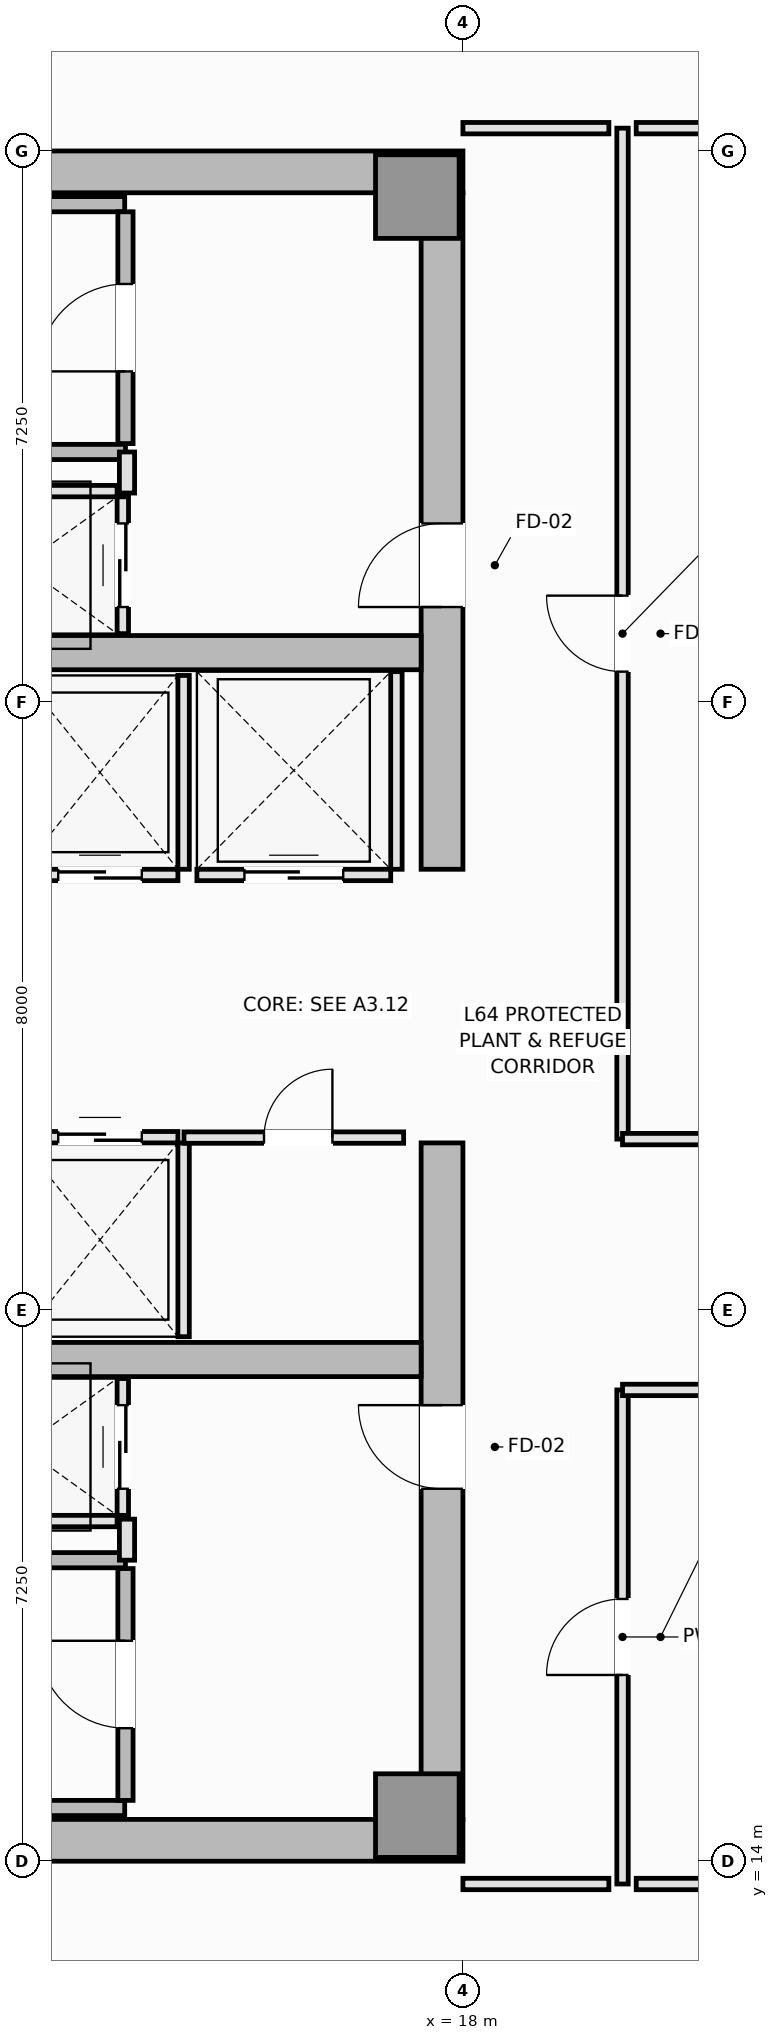
"""IFC4 building model, lengths in metres.
Left out: names, types, materials, properties, quantities, classifications, styles, units other than length and angle.
Written with IfcOpenShell. Run it as: python <this file> out.ifc"""

import sys

from ifc_helpers import new_model, si_unit, direction, frame, frame_2d, origin, origin_2d, place, context, subcontext, project, spatial, rectangle, extrude, element, fill, save


model = new_model("IFC4")
c1 = context("Model", 3, precision=1e-05, world=origin(), true_north=direction((0.0, 1.0)))
c2 = subcontext(c1, "Body", "Model", "MODEL_VIEW")
j1 = project(units=[si_unit("LENGTHUNIT", "METRE"), si_unit("PLANEANGLEUNIT", "RADIAN")], contexts=[c1])
p1 = place(None, origin())
s1 = spatial("IfcSite", under=j1, at=p1, CompositionType="ELEMENT")
p2 = place(p1, origin())
s2 = spatial("IfcBuilding", under=s1, at=p2, CompositionType="ELEMENT")
p3 = place(p2, frame((0.0, 0.0, 241.3)))
s3 = spatial("IfcBuildingStorey", under=s2, at=p3, CompositionType="ELEMENT", Elevation=241.3)
for number, where, z_axis, x_axis in (
    (1, (4.5, 14.275, 0.0), (0.0, 0.0, 1.0), (1.0, 0.0, 0.0)),
    (2, (4.5, 36.225, 0.0), (0.0, 0.0, 1.0), (1.0, 0.0, 0.0)),
):
    element("IfcWall", number, at=place(p3, frame(where, z_axis=z_axis, x_axis=x_axis)), inside=s3, PredefinedType="SHEAR", context=c2, shape_type="SweptSolid", body=[
        extrude(rectangle(XDim=13.5, YDim=0.55, at=frame_2d((6.75, 0.0))), origin(), (0.0, 0.0, 1.0), 3.55),
    ])
p4 = place(p3, frame((17.725, 14.55, 0.0), z_axis=(0.0, 0.0, 1.0), x_axis=(0.0, 1.0, 0.0)))
e3 = element("IfcWall", 3, at=p4, inside=s3, PredefinedType="SHEAR", context=c2, shape_type="SweptSolid", body=[
    extrude(rectangle(XDim=8.9, YDim=0.55, at=frame_2d((4.45, 0.0))), origin(), (0.0, 0.0, 1.0), 3.55),
])
p5 = place(p4, frame((4.35, 0.0, 0.0)))
e4 = element("IfcOpeningElement", 4, at=p5, cuts=e3, PredefinedType="OPENING", context=c2, shape_type="SweptSolid", body=[
    extrude(rectangle(XDim=1.1, YDim=2.15, at=frame_2d((0.55, 1.075))), frame((0.0, 0.285, 0.0), z_axis=(0.0, -1.0, 0.0), x_axis=(1.0, 0.0, 0.0)), (0.0, 0.0, 1.0), 0.57),
])
p6 = place(p3, frame((17.725, 27.05, 0.0), z_axis=(0.0, 0.0, 1.0), x_axis=(0.0, 1.0, 0.0)))
e5 = element("IfcWall", 5, at=p6, inside=s3, PredefinedType="SHEAR", context=c2, shape_type="SweptSolid", body=[
    extrude(rectangle(XDim=8.9, YDim=0.55, at=frame_2d((4.45, 0.0))), origin(), (0.0, 0.0, 1.0), 3.55),
])
p7 = place(p6, frame((3.45, 0.0, 0.0)))
e6 = element("IfcOpeningElement", 6, at=p7, cuts=e5, PredefinedType="OPENING", context=c2, shape_type="SweptSolid", body=[
    extrude(rectangle(XDim=1.1, YDim=2.15, at=frame_2d((0.55, 1.075))), frame((0.0, 0.285, 0.0), z_axis=(0.0, -1.0, 0.0), x_axis=(1.0, 0.0, 0.0)), (0.0, 0.0, 1.0), 0.57),
])
for number, where, z_axis, x_axis in (
    (7, (5.05, 20.6, 0.0), (0.0, 0.0, 1.0), (1.0, 0.0, 0.0)),
    (8, (5.05, 29.9, 0.0), (0.0, 0.0, 1.0), (1.0, 0.0, 0.0)),
):
    element("IfcWall", number, at=place(p3, frame(where, z_axis=z_axis, x_axis=x_axis)), inside=s3, PredefinedType="SHEAR", context=c2, shape_type="SweptSolid", body=[
        extrude(rectangle(XDim=12.4, YDim=0.45, at=frame_2d((6.2, 0.0))), origin(), (0.0, 0.0, 1.0), 3.55),
    ])
for number, where, z_axis, x_axis in (
    (9, (17.4, 14.6, 0.0), (0.0, 0.0, 1.0), (1.0, 0.0, 0.0)),
    (10, (17.4, 35.9, 0.0), (0.0, 0.0, 1.0), (1.0, 0.0, 0.0)),
):
    element("IfcColumn", number, at=place(p3, frame(where, z_axis=z_axis, x_axis=x_axis)), inside=s3, PredefinedType="PILASTER", context=c2, shape_type="SweptSolid", body=[
        extrude(rectangle(XDim=1.1, YDim=1.1, at=origin_2d()), origin(), (0.0, 0.0, 1.0), 3.55),
    ])
p8 = place(p3, frame((5.8, 14.7, 0.0), z_axis=(0.0, 0.0, 1.0), x_axis=(1.0, 0.0, 0.0)))
e11 = element("IfcWall", 11, at=p8, inside=s3, PredefinedType="SOLIDWALL", context=c2, shape_type="SweptSolid", body=[
    extrude(rectangle(XDim=7.75, YDim=0.2, at=frame_2d((3.875, 0.0))), origin(), (0.0, 0.0, 1.0), 3.55),
])
p9 = place(p3, frame((5.9, 17.96, 0.0), z_axis=(0.0, 0.0, 1.0), x_axis=(1.0, 0.0, 0.0)))
e12 = element("IfcWall", 12, at=p9, inside=s3, PredefinedType="SOLIDWALL", context=c2, shape_type="SweptSolid", body=[
    extrude(rectangle(XDim=7.66, YDim=0.2, at=frame_2d((3.83, 0.0))), origin(), (0.0, 0.0, 1.0), 3.55),
])
p10 = place(p3, frame((13.56, 14.8, 0.0), z_axis=(0.0, 0.0, 1.0), x_axis=(0.0, 1.0, 0.0)))
e13 = element("IfcWall", 13, at=p10, inside=s3, PredefinedType="SOLIDWALL", context=c2, shape_type="SweptSolid", body=[
    extrude(rectangle(XDim=3.05, YDim=0.2, at=frame_2d((1.525, 0.0))), origin(), (0.0, 0.0, 1.0), 3.55),
])
p11 = place(p10, frame((0.95, 0.0, 0.0)))
e14 = element("IfcOpeningElement", 14, at=p11, cuts=e13, PredefinedType="OPENING", context=c2, shape_type="SweptSolid", body=[
    extrude(rectangle(XDim=1.15, YDim=2.15, at=frame_2d((0.575, 1.075))), frame((0.0, 0.11, 0.0), z_axis=(0.0, -1.0, 0.0), x_axis=(1.0, 0.0, 0.0)), (0.0, 0.0, 1.0), 0.22),
])
p12 = place(p3, frame((5.8, 35.8, 0.0), z_axis=(0.0, 0.0, 1.0), x_axis=(1.0, 0.0, 0.0)))
e15 = element("IfcWall", 15, at=p12, inside=s3, PredefinedType="SOLIDWALL", context=c2, shape_type="SweptSolid", body=[
    extrude(rectangle(XDim=7.75, YDim=0.2, at=frame_2d((3.875, 0.0))), origin(), (0.0, 0.0, 1.0), 3.55),
])
p13 = place(p3, frame((5.9, 32.54, 0.0), z_axis=(0.0, 0.0, 1.0), x_axis=(1.0, 0.0, 0.0)))
e16 = element("IfcWall", 16, at=p13, inside=s3, PredefinedType="SOLIDWALL", context=c2, shape_type="SweptSolid", body=[
    extrude(rectangle(XDim=7.66, YDim=0.2, at=frame_2d((3.83, 0.0))), origin(), (0.0, 0.0, 1.0), 3.55),
])
p14 = place(p3, frame((13.56, 32.65, 0.0), z_axis=(0.0, 0.0, 1.0), x_axis=(0.0, 1.0, 0.0)))
e17 = element("IfcWall", 17, at=p14, inside=s3, PredefinedType="SOLIDWALL", context=c2, shape_type="SweptSolid", body=[
    extrude(rectangle(XDim=3.05, YDim=0.2, at=frame_2d((1.525, 0.0))), origin(), (0.0, 0.0, 1.0), 3.55),
])
p15 = place(p14, frame((0.95, 0.0, 0.0)))
e18 = element("IfcOpeningElement", 18, at=p15, cuts=e17, PredefinedType="OPENING", context=c2, shape_type="SweptSolid", body=[
    extrude(rectangle(XDim=1.15, YDim=2.15, at=frame_2d((0.575, 1.075))), frame((0.0, 0.11, 0.0), z_axis=(0.0, -1.0, 0.0), x_axis=(1.0, 0.0, 0.0)), (0.0, 0.0, 1.0), 0.22),
])
p16 = place(p3, frame((12.2, 23.525, 0.0), z_axis=(0.0, 0.0, 1.0), x_axis=(1.0, 0.0, 0.0)))
e19 = element("IfcWall", 19, at=p16, inside=s3, PredefinedType="PARTITIONING", context=c2, shape_type="SweptSolid", body=[
    extrude(rectangle(XDim=2.05, YDim=0.15, at=frame_2d((1.025, 0.0))), origin(), (0.0, 0.0, 1.0), 3.39),
])
p17 = place(p16, frame((0.475, 0.0, 0.0)))
e20 = element("IfcOpeningElement", 20, at=p17, cuts=e19, PredefinedType="OPENING", context=c2, shape_type="SweptSolid", body=[
    extrude(rectangle(XDim=1.1, YDim=2.2, at=frame_2d((0.55, 1.1))), frame((0.0, 0.085, 0.0), z_axis=(0.0, -1.0, 0.0), x_axis=(1.0, 0.0, 0.0)), (0.0, 0.0, 1.0), 0.17),
])
p18 = place(p3, frame((14.325, 20.9, 0.0), z_axis=(0.0, 0.0, 1.0), x_axis=(0.0, 1.0, 0.0)))
e21 = element("IfcWall", 21, at=p18, inside=s3, PredefinedType="PARTITIONING", context=c2, shape_type="SweptSolid", body=[
    extrude(rectangle(XDim=2.55, YDim=0.15, at=frame_2d((1.275, 0.0))), origin(), (0.0, 0.0, 1.0), 3.39),
])
p19 = place(p3, frame((12.2, 26.975, 0.0), z_axis=(0.0, 0.0, 1.0), x_axis=(1.0, 0.0, 0.0)))
e22 = element("IfcWall", 22, at=p19, inside=s3, PredefinedType="PARTITIONING", context=c2, shape_type="SweptSolid", body=[
    extrude(rectangle(XDim=2.05, YDim=0.15, at=frame_2d((1.025, 0.0))), origin(), (0.0, 0.0, 1.0), 3.39),
])
p20 = place(p19, frame((0.475, 0.0, 0.0)))
e23 = element("IfcOpeningElement", 23, at=p20, cuts=e22, PredefinedType="OPENING", context=c2, shape_type="SweptSolid", body=[
    extrude(rectangle(XDim=1.1, YDim=2.2, at=frame_2d((0.55, 1.1))), frame((0.0, 0.085, 0.0), z_axis=(0.0, -1.0, 0.0), x_axis=(1.0, 0.0, 0.0)), (0.0, 0.0, 1.0), 0.17),
])
p21 = place(p3, frame((14.325, 27.05, 0.0), z_axis=(0.0, 0.0, 1.0), x_axis=(0.0, 1.0, 0.0)))
e24 = element("IfcWall", 24, at=p21, inside=s3, PredefinedType="PARTITIONING", context=c2, shape_type="SweptSolid", body=[
    extrude(rectangle(XDim=2.55, YDim=0.15, at=frame_2d((1.275, 0.0))), origin(), (0.0, 0.0, 1.0), 3.39),
])
p22 = place(p3, frame((14.5, 26.975, 0.0), z_axis=(0.0, 0.0, 1.0), x_axis=(1.0, 0.0, 0.0)))
e25 = element("IfcWall", 25, at=p22, inside=s3, PredefinedType="PARTITIONING", context=c2, shape_type="SweptSolid", body=[
    extrude(rectangle(XDim=2.55, YDim=0.15, at=frame_2d((1.275, 0.0))), origin(), (0.0, 0.0, 1.0), 3.39),
])
p23 = place(p22, frame((0.625, 0.0, 0.0)))
e26 = element("IfcOpeningElement", 26, at=p23, cuts=e25, PredefinedType="OPENING", context=c2, shape_type="SweptSolid", body=[
    extrude(rectangle(XDim=1.3, YDim=2.2, at=frame_2d((0.65, 1.1))), frame((0.0, 0.085, 0.0), z_axis=(0.0, -1.0, 0.0), x_axis=(1.0, 0.0, 0.0)), (0.0, 0.0, 1.0), 0.17),
])
p24 = place(p3, frame((17.125, 27.05, 0.0), z_axis=(0.0, 0.0, 1.0), x_axis=(0.0, 1.0, 0.0)))
e27 = element("IfcWall", 27, at=p24, inside=s3, PredefinedType="PARTITIONING", context=c2, shape_type="SweptSolid", body=[
    extrude(rectangle(XDim=2.6, YDim=0.15, at=frame_2d((1.3, 0.0))), origin(), (0.0, 0.0, 1.0), 3.39),
])
p25 = place(p3, frame((10.95, 18.475, 0.0), z_axis=(0.0, 0.0, 1.0), x_axis=(1.0, 0.0, 0.0)))
e28 = element("IfcWall", 28, at=p25, inside=s3, PredefinedType="PARTITIONING", context=c2, shape_type="SweptSolid", body=[
    extrude(rectangle(XDim=2.5, YDim=0.15, at=frame_2d((1.25, 0.0))), origin(), (0.0, 0.0, 1.0), 3.39),
])
p26 = place(p3, frame((13.525, 18.55, 0.0), z_axis=(0.0, 0.0, 1.0), x_axis=(0.0, 1.0, 0.0)))
e29 = element("IfcWall", 29, at=p26, inside=s3, PredefinedType="PARTITIONING", context=c2, shape_type="SweptSolid", body=[
    extrude(rectangle(XDim=1.8, YDim=0.15, at=frame_2d((0.9, 0.0))), origin(), (0.0, 0.0, 1.0), 3.39),
])
p27 = place(p26, frame((0.35, 0.0, 0.0)))
e30 = element("IfcOpeningElement", 30, at=p27, cuts=e29, PredefinedType="OPENING", context=c2, shape_type="SweptSolid", body=[
    extrude(rectangle(XDim=1.1, YDim=2.2, at=frame_2d((0.55, 1.1))), frame((0.0, 0.085, 0.0), z_axis=(0.0, -1.0, 0.0), x_axis=(1.0, 0.0, 0.0)), (0.0, 0.0, 1.0), 0.17),
])
p28 = place(p3, frame((10.95, 32.025, 0.0), z_axis=(0.0, 0.0, 1.0), x_axis=(1.0, 0.0, 0.0)))
e31 = element("IfcWall", 31, at=p28, inside=s3, PredefinedType="PARTITIONING", context=c2, shape_type="SweptSolid", body=[
    extrude(rectangle(XDim=2.5, YDim=0.15, at=frame_2d((1.25, 0.0))), origin(), (0.0, 0.0, 1.0), 3.39),
])
p29 = place(p3, frame((13.525, 30.15, 0.0), z_axis=(0.0, 0.0, 1.0), x_axis=(0.0, 1.0, 0.0)))
e32 = element("IfcWall", 32, at=p29, inside=s3, PredefinedType="PARTITIONING", context=c2, shape_type="SweptSolid", body=[
    extrude(rectangle(XDim=1.8, YDim=0.15, at=frame_2d((0.9, 0.0))), origin(), (0.0, 0.0, 1.0), 3.39),
])
p30 = place(p29, frame((0.35, 0.0, 0.0)))
e33 = element("IfcOpeningElement", 33, at=p30, cuts=e32, PredefinedType="OPENING", context=c2, shape_type="SweptSolid", body=[
    extrude(rectangle(XDim=1.1, YDim=2.2, at=frame_2d((0.55, 1.1))), frame((0.0, 0.085, 0.0), z_axis=(0.0, -1.0, 0.0), x_axis=(1.0, 0.0, 0.0)), (0.0, 0.0, 1.0), 0.17),
])
for number, where, z_axis, x_axis in (
    (34, (13.58, 17.96, 0.0), (0.0, 0.0, 1.0), (0.0, 1.0, 0.0)),
    (35, (13.58, 32.0, 0.0), (0.0, 0.0, 1.0), (0.0, 1.0, 0.0)),
):
    element("IfcWall", number, at=place(p3, frame(where, z_axis=z_axis, x_axis=x_axis)), inside=s3, PredefinedType="PARTITIONING", context=c2, shape_type="SweptSolid", body=[
        extrude(rectangle(XDim=0.54, YDim=0.2, at=frame_2d((0.27, 0.0))), origin(), (0.0, 0.0, 1.0), 3.39),
    ])
p31 = place(p3, frame((14.33, 23.52, 0.0), z_axis=(0.0, 0.0, 1.0), x_axis=(1.0, 0.0, 0.0)))
e36 = element("IfcWall", 36, at=p31, inside=s3, PredefinedType="PARTITIONING", context=c2, shape_type="SweptSolid", body=[
    extrude(rectangle(XDim=2.89, YDim=0.15, at=frame_2d((1.445, 0.0))), origin(), (0.0, 0.0, 1.0), 3.39),
])
p32 = place(p31, frame((1.053, 0.0, 0.0)))
e37 = element("IfcOpeningElement", 37, at=p32, cuts=e36, PredefinedType="OPENING", context=c2, shape_type="SweptSolid", body=[
    extrude(rectangle(XDim=0.9, YDim=2.1, at=frame_2d((0.45, 1.05))), frame((0.0, 0.085, 0.0), z_axis=(0.0, -1.0, 0.0), x_axis=(1.0, 0.0, 0.0)), (0.0, 0.0, 1.0), 0.17),
])
p33 = place(p3, frame((20.1, 13.7, 0.0), z_axis=(0.0, 0.0, 1.0), x_axis=(0.0, 1.0, 0.0)))
e38 = element("IfcWall", 38, at=p33, inside=s3, PredefinedType="PARTITIONING", context=c2, shape_type="SweptSolid", body=[
    extrude(rectangle(XDim=6.5, YDim=0.15, at=frame_2d((3.25, 0.0))), origin(), (0.0, 0.0, 1.0), 3.39),
])
p34 = place(p33, frame((2.75, 0.0, 0.0)))
e39 = element("IfcOpeningElement", 39, at=p34, cuts=e38, PredefinedType="OPENING", context=c2, shape_type="SweptSolid", body=[
    extrude(rectangle(XDim=1.0, YDim=2.15, at=frame_2d((0.5, 1.075))), frame((0.0, 0.085, 0.0), z_axis=(0.0, -1.0, 0.0), x_axis=(1.0, 0.0, 0.0)), (0.0, 0.0, 1.0), 0.17),
])
p35 = place(p3, frame((20.1, 23.5, 0.0), z_axis=(0.0, 0.0, 1.0), x_axis=(0.0, 1.0, 0.0)))
e40 = element("IfcWall", 40, at=p35, inside=s3, PredefinedType="PARTITIONING", context=c2, shape_type="SweptSolid", body=[
    extrude(rectangle(XDim=13.3, YDim=0.15, at=frame_2d((6.65, 0.0))), origin(), (0.0, 0.0, 1.0), 3.39),
])
p36 = place(p35, frame((6.15, 0.0, 0.0)))
e41 = element("IfcOpeningElement", 41, at=p36, cuts=e40, PredefinedType="OPENING", context=c2, shape_type="SweptSolid", body=[
    extrude(rectangle(XDim=1.0, YDim=2.15, at=frame_2d((0.5, 1.075))), frame((0.0, 0.085, 0.0), z_axis=(0.0, -1.0, 0.0), x_axis=(1.0, 0.0, 0.0)), (0.0, 0.0, 1.0), 0.17),
])
p37 = place(p3, frame((20.1, 20.2, 0.0), z_axis=(0.0, 0.0, 1.0), x_axis=(1.0, 0.0, 0.0)))
e42 = element("IfcWall", 42, at=p37, inside=s3, PredefinedType="PARTITIONING", context=c2, shape_type="SweptSolid", body=[
    extrude(rectangle(XDim=9.1, YDim=0.15, at=frame_2d((4.55, 0.0))), origin(), (0.0, 0.0, 1.0), 3.39),
])
p38 = place(p3, frame((20.1, 23.5, 0.0), z_axis=(0.0, 0.0, 1.0), x_axis=(1.0, 0.0, 0.0)))
e43 = element("IfcWall", 43, at=p38, inside=s3, PredefinedType="PARTITIONING", context=c2, shape_type="SweptSolid", body=[
    extrude(rectangle(XDim=11.7, YDim=0.15, at=frame_2d((5.85, 0.0))), origin(), (0.0, 0.0, 1.0), 3.39),
])
p39 = place(p3, frame((29.02, 13.7, 0.0), z_axis=(0.0, 0.0, 1.0), x_axis=(-1.0, 0.0, 0.0)))
e44 = element("IfcWall", 44, at=p39, inside=s3, PredefinedType="PARTITIONING", context=c2, shape_type="SweptSolid", body=[
    extrude(rectangle(XDim=8.74, YDim=0.15, at=frame_2d((4.37, 0.0))), origin(), (0.0, 0.0, 1.0), 3.39),
])
for number, where, z_axis, x_axis in (
    (45, (19.92, 13.7, 0.0), (0.0, 0.0, 1.0), (-1.0, 0.0, 0.0)),
    (46, (18.0, 36.8, 0.0), (0.0, 0.0, 1.0), (1.0, 0.0, 0.0)),
):
    element("IfcWall", number, at=place(p3, frame(where, z_axis=z_axis, x_axis=x_axis)), inside=s3, PredefinedType="PARTITIONING", context=c2, shape_type="SweptSolid", body=[
        extrude(rectangle(XDim=1.92, YDim=0.15, at=frame_2d((0.96, 0.0))), origin(), (0.0, 0.0, 1.0), 3.39),
    ])
p40 = place(p3, frame((20.28, 36.8, 0.0), z_axis=(0.0, 0.0, 1.0), x_axis=(1.0, 0.0, 0.0)))
e47 = element("IfcWall", 47, at=p40, inside=s3, PredefinedType="PARTITIONING", context=c2, shape_type="SweptSolid", body=[
    extrude(rectangle(XDim=11.34, YDim=0.15, at=frame_2d((5.67, 0.0))), origin(), (0.0, 0.0, 1.0), 3.39),
])
p41 = place(p11, origin())
e48 = element("IfcDoor", 48, at=p41, inside=s3, OperationType="SINGLE_SWING_RIGHT", PredefinedType="DOOR", context=c2, shape_type="SweptSolid", body=[
    extrude(rectangle(XDim=1.15, YDim=2.15, at=frame_2d((0.575, 1.075))), frame((0.0, 0.025, 0.0), z_axis=(0.0, -1.0, 0.0), x_axis=(1.0, 0.0, 0.0)), (0.0, 0.0, 1.0), 0.05),
])
fill(e14, e48)
p42 = place(p15, origin())
e49 = element("IfcDoor", 49, at=p42, inside=s3, OperationType="SINGLE_SWING_LEFT", PredefinedType="DOOR", context=c2, shape_type="SweptSolid", body=[
    extrude(rectangle(XDim=1.15, YDim=2.15, at=frame_2d((0.575, 1.075))), frame((0.0, 0.025, 0.0), z_axis=(0.0, -1.0, 0.0), x_axis=(1.0, 0.0, 0.0)), (0.0, 0.0, 1.0), 0.05),
])
fill(e18, e49)
p43 = place(p17, origin())
e50 = element("IfcDoor", 50, at=p43, inside=s3, OperationType="DOUBLE_DOOR_SLIDING", PredefinedType="DOOR", context=c2, shape_type="SweptSolid", body=[
    extrude(rectangle(XDim=1.1, YDim=2.2, at=frame_2d((0.55, 1.1))), frame((0.0, 0.025, 0.0), z_axis=(0.0, -1.0, 0.0), x_axis=(1.0, 0.0, 0.0)), (0.0, 0.0, 1.0), 0.05),
])
fill(e20, e50)
p44 = place(p20, origin())
e51 = element("IfcDoor", 51, at=p44, inside=s3, OperationType="DOUBLE_DOOR_SLIDING", PredefinedType="DOOR", context=c2, shape_type="SweptSolid", body=[
    extrude(rectangle(XDim=1.1, YDim=2.2, at=frame_2d((0.55, 1.1))), frame((0.0, 0.025, 0.0), z_axis=(0.0, -1.0, 0.0), x_axis=(1.0, 0.0, 0.0)), (0.0, 0.0, 1.0), 0.05),
])
fill(e23, e51)
p45 = place(p23, origin())
e52 = element("IfcDoor", 52, at=p45, inside=s3, OperationType="DOUBLE_DOOR_SLIDING", PredefinedType="DOOR", context=c2, shape_type="SweptSolid", body=[
    extrude(rectangle(XDim=1.3, YDim=2.2, at=frame_2d((0.65, 1.1))), frame((0.0, 0.025, 0.0), z_axis=(0.0, -1.0, 0.0), x_axis=(1.0, 0.0, 0.0)), (0.0, 0.0, 1.0), 0.05),
])
fill(e26, e52)
p46 = place(p27, origin())
e53 = element("IfcDoor", 53, at=p46, inside=s3, OperationType="DOUBLE_DOOR_SLIDING", PredefinedType="DOOR", context=c2, shape_type="SweptSolid", body=[
    extrude(rectangle(XDim=1.1, YDim=2.2, at=frame_2d((0.55, 1.1))), frame((0.0, 0.025, 0.0), z_axis=(0.0, -1.0, 0.0), x_axis=(1.0, 0.0, 0.0)), (0.0, 0.0, 1.0), 0.05),
])
fill(e30, e53)
p47 = place(p30, origin())
e54 = element("IfcDoor", 54, at=p47, inside=s3, OperationType="DOUBLE_DOOR_SLIDING", PredefinedType="DOOR", context=c2, shape_type="SweptSolid", body=[
    extrude(rectangle(XDim=1.1, YDim=2.2, at=frame_2d((0.55, 1.1))), frame((0.0, 0.025, 0.0), z_axis=(0.0, -1.0, 0.0), x_axis=(1.0, 0.0, 0.0)), (0.0, 0.0, 1.0), 0.05),
])
fill(e33, e54)
p48 = place(p5, origin())
e55 = element("IfcDoor", 55, at=p48, inside=s3, OperationType="SINGLE_SWING_RIGHT", PredefinedType="DOOR", context=c2, shape_type="SweptSolid", body=[
    extrude(rectangle(XDim=1.1, YDim=2.15, at=frame_2d((0.55, 1.075))), frame((0.0, 0.025, 0.0), z_axis=(0.0, -1.0, 0.0), x_axis=(1.0, 0.0, 0.0)), (0.0, 0.0, 1.0), 0.05),
])
fill(e4, e55)
p49 = place(p7, origin())
e56 = element("IfcDoor", 56, at=p49, inside=s3, OperationType="SINGLE_SWING_LEFT", PredefinedType="DOOR", context=c2, shape_type="SweptSolid", body=[
    extrude(rectangle(XDim=1.1, YDim=2.15, at=frame_2d((0.55, 1.075))), frame((0.0, 0.025, 0.0), z_axis=(0.0, -1.0, 0.0), x_axis=(1.0, 0.0, 0.0)), (0.0, 0.0, 1.0), 0.05),
])
fill(e6, e56)
p50 = place(p32, origin())
e57 = element("IfcDoor", 57, at=p50, inside=s3, OperationType="SINGLE_SWING_RIGHT", PredefinedType="DOOR", context=c2, shape_type="SweptSolid", body=[
    extrude(rectangle(XDim=0.9, YDim=2.1, at=frame_2d((0.45, 1.05))), frame((0.0, 0.025, 0.0), z_axis=(0.0, -1.0, 0.0), x_axis=(1.0, 0.0, 0.0)), (0.0, 0.0, 1.0), 0.05),
])
fill(e37, e57)
p51 = place(p34, origin())
e58 = element("IfcDoor", 58, at=p51, inside=s3, OperationType="SINGLE_SWING_LEFT", PredefinedType="DOOR", context=c2, shape_type="SweptSolid", body=[
    extrude(rectangle(XDim=1.0, YDim=2.15, at=frame_2d((0.5, 1.075))), frame((0.0, 0.025, 0.0), z_axis=(0.0, -1.0, 0.0), x_axis=(1.0, 0.0, 0.0)), (0.0, 0.0, 1.0), 0.05),
])
fill(e39, e58)
p52 = place(p36, origin())
e59 = element("IfcDoor", 59, at=p52, inside=s3, OperationType="SINGLE_SWING_RIGHT", PredefinedType="DOOR", context=c2, shape_type="SweptSolid", body=[
    extrude(rectangle(XDim=1.0, YDim=2.15, at=frame_2d((0.5, 1.075))), frame((0.0, 0.025, 0.0), z_axis=(0.0, -1.0, 0.0), x_axis=(1.0, 0.0, 0.0)), (0.0, 0.0, 1.0), 0.05),
])
fill(e41, e59)
save(model, sys.argv[1])
